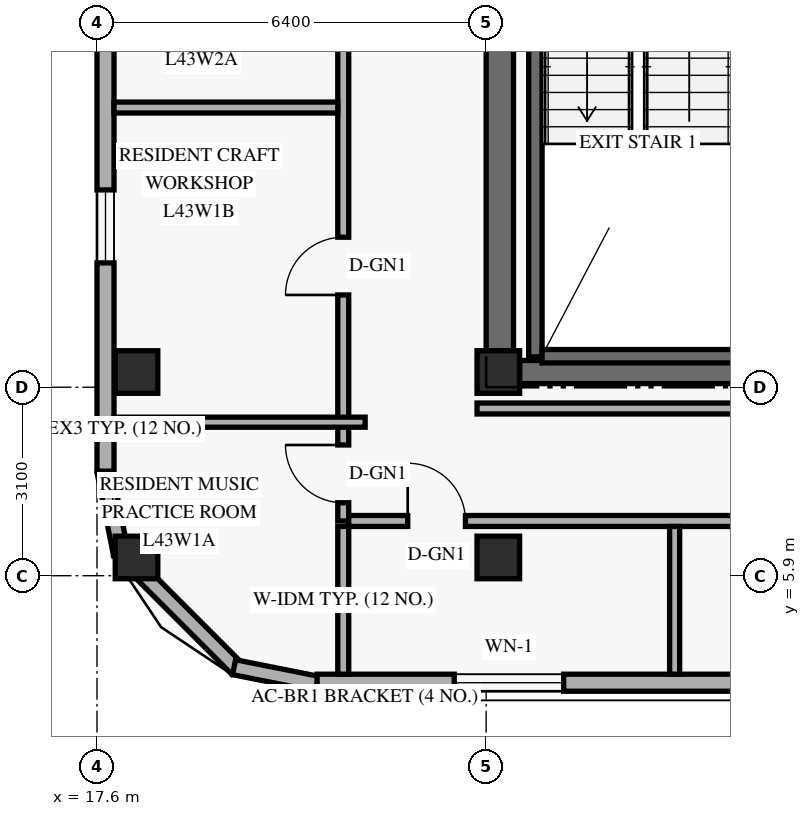
"""IFC4 building model, lengths in metres.
Left out: names, types, materials, properties, quantities, classifications, styles, units other than length and angle.
Written with IfcOpenShell. Run it as: python <this file> out.ifc"""

import sys

from ifc_helpers import new_model, si_unit, direction, frame, frame_2d, origin, origin_2d, place, context, subcontext, project, spatial, rectangle, extrude, element, fill, save


model = new_model("IFC4")
c1 = context("Model", 3, precision=1e-05, world=origin(), true_north=direction((0.0, 1.0)))
c2 = subcontext(c1, "Body", "Model", "MODEL_VIEW")
j1 = project(units=[si_unit("LENGTHUNIT", "METRE"), si_unit("PLANEANGLEUNIT", "RADIAN")], contexts=[c1])
p1 = place(None, origin())
s1 = spatial("IfcSite", under=j1, at=p1, CompositionType="ELEMENT")
p2 = place(p1, origin())
s2 = spatial("IfcBuilding", under=s1, at=p2, CompositionType="ELEMENT")
p3 = place(p2, frame((0.0, 0.0, 166.2)))
s3 = spatial("IfcBuildingStorey", under=s2, at=p3, CompositionType="ELEMENT", Elevation=166.2)
p4 = place(p3, frame((24.225, 9.6, 0.0), z_axis=(0.0, 0.0, 1.0), x_axis=(0.0, 1.0, 0.0)))
e1 = element("IfcWall", 1, at=p4, inside=s3, PredefinedType="SHEAR", context=c2, shape_type="SweptSolid", body=[
    extrude(rectangle(XDim=7.6, YDim=0.45, at=frame_2d((3.8, 0.0))), origin(), (0.0, 0.0, 1.0), 2.748),
])
p5 = place(p3, frame((24.55, 9.25, 0.0), z_axis=(0.0, 0.0, 1.0), x_axis=(1.0, 0.0, 0.0)))
e2 = element("IfcWall", 2, at=p5, inside=s3, PredefinedType="SHEAR", context=c2, shape_type="SweptSolid", body=[
    extrude(rectangle(XDim=10.3, YDim=0.38, at=frame_2d((5.15, 0.0))), origin(), (0.0, 0.0, 1.0), 3.36),
])
p6 = place(p5, frame((5.2, 0.0, 0.0)))
e3 = element("IfcOpeningElement", 3, at=p6, cuts=e2, PredefinedType="OPENING", context=c2, shape_type="SweptSolid", body=[
    extrude(rectangle(XDim=1.05, YDim=2.15, at=frame_2d((0.525, 1.075))), frame((0.0, 0.2, 0.0), z_axis=(0.0, -1.0, 0.0), x_axis=(1.0, 0.0, 0.0)), (0.0, 0.0, 1.0), 0.4),
])
p7 = place(p3, frame((24.81, 9.5, 0.0), z_axis=(0.0, 0.0, 1.0), x_axis=(0.0, 1.0, 0.0)))
e4 = element("IfcWall", 4, at=p7, inside=s3, PredefinedType="SHEAR", context=c2, shape_type="SweptSolid", body=[
    extrude(rectangle(XDim=7.76, YDim=0.22, at=frame_2d((3.88, 0.0))), origin(), (0.0, 0.0, 1.0), 3.36),
])
p8 = place(p3, frame((24.92, 9.51, 0.0), z_axis=(0.0, 0.0, 1.0), x_axis=(1.0, 0.0, 0.0)))
e5 = element("IfcWall", 5, at=p8, inside=s3, PredefinedType="SHEAR", context=c2, shape_type="SweptSolid", body=[
    extrude(rectangle(XDim=3.16, YDim=0.22, at=frame_2d((1.58, 0.0))), origin(), (0.0, 0.0, 1.0), 3.36),
])
for number, where, z_axis, x_axis in (
    (6, (18.25, 6.2, 0.0), (0.0, 0.0, 1.0), (1.0, 0.0, 0.0)),
    (7, (18.25, 9.25, 0.0), (0.0, 0.0, 1.0), (1.0, 0.0, 0.0)),
    (8, (24.2, 6.2, 0.0), (0.0, 0.0, 1.0), (1.0, 0.0, 0.0)),
    (9, (24.2, 9.25, 0.0), (0.0, 0.0, 1.0), (1.0, 0.0, 0.0)),
):
    element("IfcColumn", number, at=place(p3, frame(where, z_axis=z_axis, x_axis=x_axis)), inside=s3, PredefinedType="COLUMN", context=c2, shape_type="SweptSolid", body=[
        extrude(rectangle(XDim=0.7, YDim=0.7, at=origin_2d()), origin(), (0.0, 0.0, 1.0), 3.6),
    ])
p9 = place(p3, frame((17.724, 7.616, 0.0), z_axis=(0.0, 0.0, 1.0), x_axis=(0.195135625965, -0.9807762678, 0.0)))
e10 = element("IfcWall", 10, at=p9, inside=s3, PredefinedType="SOLIDWALL", context=c2, shape_type="SweptSolid", body=[
    extrude(rectangle(XDim=1.389, YDim=0.25, at=frame_2d((0.694, 0.0))), origin(), (0.0, 0.0, 1.0), 3.36),
])
p10 = place(p3, frame((17.968, 6.305, 0.0), z_axis=(0.0, 0.0, 1.0), x_axis=(0.707106781187, -0.707106781187, 0.0)))
e11 = element("IfcWall", 11, at=p10, inside=s3, PredefinedType="SOLIDWALL", context=c2, shape_type="SweptSolid", body=[
    extrude(rectangle(XDim=2.739, YDim=0.25, at=frame_2d((1.37, 0.0))), origin(), (0.0, 0.0, 1.0), 3.36),
])
p11 = place(p3, frame((19.854, 4.395, 0.0), z_axis=(0.0, 0.0, 1.0), x_axis=(0.980809899341, -0.19496651342, 0.0)))
e12 = element("IfcWall", 12, at=p11, inside=s3, PredefinedType="SOLIDWALL", context=c2, shape_type="SweptSolid", body=[
    extrude(rectangle(XDim=1.389, YDim=0.25, at=frame_2d((0.694, 0.0))), origin(), (0.0, 0.0, 1.0), 3.36),
])
p12 = place(p3, frame((21.22, 4.14, 0.0), z_axis=(0.0, 0.0, 1.0), x_axis=(1.0, 0.0, 0.0)))
e13 = element("IfcWall", 13, at=p12, inside=s3, PredefinedType="SOLIDWALL", context=c2, shape_type="SweptSolid", body=[
    extrude(rectangle(XDim=33.76, YDim=0.28, at=frame_2d((16.88, 0.0))), origin(), (0.0, 0.0, 1.0), 3.36),
])
p13 = place(p12, frame((2.255, 0.0, 0.85)))
e14 = element("IfcOpeningElement", 14, at=p13, cuts=e13, PredefinedType="OPENING", context=c2, shape_type="SweptSolid", body=[
    extrude(rectangle(XDim=1.8, YDim=1.6, at=frame_2d((0.9, 0.8))), frame((0.0, 0.15, 0.0), z_axis=(0.0, -1.0, 0.0), x_axis=(1.0, 0.0, 0.0)), (0.0, 0.0, 1.0), 0.3),
])
p14 = place(p12, frame((9.14, 0.0, 0.85)))
e15 = element("IfcOpeningElement", 15, at=p14, cuts=e13, PredefinedType="OPENING", context=c2, shape_type="SweptSolid", body=[
    extrude(rectangle(XDim=1.8, YDim=1.6, at=frame_2d((0.9, 0.8))), frame((0.0, 0.15, 0.0), z_axis=(0.0, -1.0, 0.0), x_axis=(1.0, 0.0, 0.0)), (0.0, 0.0, 1.0), 0.3),
])
p15 = place(p12, frame((14.565, 0.0, 0.85)))
e16 = element("IfcOpeningElement", 16, at=p15, cuts=e13, PredefinedType="OPENING", context=c2, shape_type="SweptSolid", body=[
    extrude(rectangle(XDim=1.8, YDim=1.6, at=frame_2d((0.9, 0.8))), frame((0.0, 0.15, 0.0), z_axis=(0.0, -1.0, 0.0), x_axis=(1.0, 0.0, 0.0)), (0.0, 0.0, 1.0), 0.3),
])
p16 = place(p12, frame((20.088, 0.0, 0.85)))
e17 = element("IfcOpeningElement", 17, at=p16, cuts=e13, PredefinedType="OPENING", context=c2, shape_type="SweptSolid", body=[
    extrude(rectangle(XDim=1.8, YDim=1.6, at=frame_2d((0.9, 0.8))), frame((0.0, 0.15, 0.0), z_axis=(0.0, -1.0, 0.0), x_axis=(1.0, 0.0, 0.0)), (0.0, 0.0, 1.0), 0.3),
])
p17 = place(p12, frame((25.546, 0.0, 0.85)))
e18 = element("IfcOpeningElement", 18, at=p17, cuts=e13, PredefinedType="OPENING", context=c2, shape_type="SweptSolid", body=[
    extrude(rectangle(XDim=1.2, YDim=1.5, at=frame_2d((0.6, 0.75))), frame((0.0, 0.15, 0.0), z_axis=(0.0, -1.0, 0.0), x_axis=(1.0, 0.0, 0.0)), (0.0, 0.0, 1.0), 0.3),
])
p18 = place(p12, frame((29.503, 0.0, 0.85)))
e19 = element("IfcOpeningElement", 19, at=p18, cuts=e13, PredefinedType="OPENING", context=c2, shape_type="SweptSolid", body=[
    extrude(rectangle(XDim=1.8, YDim=1.6, at=frame_2d((0.9, 0.8))), frame((0.0, 0.15, 0.0), z_axis=(0.0, -1.0, 0.0), x_axis=(1.0, 0.0, 0.0)), (0.0, 0.0, 1.0), 0.3),
])
p19 = place(p3, frame((17.74, 40.38, 0.0), z_axis=(0.0, 0.0, 1.0), x_axis=(0.0, -1.0, 0.0)))
e20 = element("IfcWall", 20, at=p19, inside=s3, PredefinedType="SOLIDWALL", context=c2, shape_type="SweptSolid", body=[
    extrude(rectangle(XDim=32.76, YDim=0.28, at=frame_2d((16.38, 0.0))), origin(), (0.0, 0.0, 1.0), 3.36),
])
p20 = place(p19, frame((28.135, 0.0, 0.85)))
e21 = element("IfcOpeningElement", 21, at=p20, cuts=e20, PredefinedType="OPENING", context=c2, shape_type="SweptSolid", body=[
    extrude(rectangle(XDim=1.2, YDim=1.5, at=frame_2d((0.6, 0.75))), frame((0.0, 0.15, 0.0), z_axis=(0.0, -1.0, 0.0), x_axis=(1.0, 0.0, 0.0)), (0.0, 0.0, 1.0), 0.3),
])
p21 = place(p19, frame((24.425, 0.0, 0.85)))
e22 = element("IfcOpeningElement", 22, at=p21, cuts=e20, PredefinedType="OPENING", context=c2, shape_type="SweptSolid", body=[
    extrude(rectangle(XDim=1.2, YDim=1.5, at=frame_2d((0.6, 0.75))), frame((0.0, 0.15, 0.0), z_axis=(0.0, -1.0, 0.0), x_axis=(1.0, 0.0, 0.0)), (0.0, 0.0, 1.0), 0.3),
])
p22 = place(p19, frame((18.38, 0.0, 0.85)))
e23 = element("IfcOpeningElement", 23, at=p22, cuts=e20, PredefinedType="OPENING", context=c2, shape_type="SweptSolid", body=[
    extrude(rectangle(XDim=1.2, YDim=1.5, at=frame_2d((0.6, 0.75))), frame((0.0, 0.15, 0.0), z_axis=(0.0, -1.0, 0.0), x_axis=(1.0, 0.0, 0.0)), (0.0, 0.0, 1.0), 0.3),
])
p23 = place(p19, frame((12.955, 0.0, 0.85)))
e24 = element("IfcOpeningElement", 24, at=p23, cuts=e20, PredefinedType="OPENING", context=c2, shape_type="SweptSolid", body=[
    extrude(rectangle(XDim=1.2, YDim=1.5, at=frame_2d((0.6, 0.75))), frame((0.0, 0.15, 0.0), z_axis=(0.0, -1.0, 0.0), x_axis=(1.0, 0.0, 0.0)), (0.0, 0.0, 1.0), 0.3),
])
p24 = place(p19, frame((7.26, 0.0, 0.85)))
e25 = element("IfcOpeningElement", 25, at=p24, cuts=e20, PredefinedType="OPENING", context=c2, shape_type="SweptSolid", body=[
    extrude(rectangle(XDim=1.2, YDim=1.5, at=frame_2d((0.6, 0.75))), frame((0.0, 0.15, 0.0), z_axis=(0.0, -1.0, 0.0), x_axis=(1.0, 0.0, 0.0)), (0.0, 0.0, 1.0), 0.3),
])
p25 = place(p19, frame((3.425, 0.0, 0.85)))
e26 = element("IfcOpeningElement", 26, at=p25, cuts=e20, PredefinedType="OPENING", context=c2, shape_type="SweptSolid", body=[
    extrude(rectangle(XDim=1.2, YDim=1.5, at=frame_2d((0.6, 0.75))), frame((0.0, 0.15, 0.0), z_axis=(0.0, -1.0, 0.0), x_axis=(1.0, 0.0, 0.0)), (0.0, 0.0, 1.0), 0.3),
])
p26 = place(p3, frame((21.65, 6.8, 0.0), z_axis=(0.0, 0.0, 1.0), x_axis=(0.0, 1.0, 0.0)))
e27 = element("IfcWall", 27, at=p26, inside=s3, PredefinedType="STANDARD", context=c2, shape_type="SweptSolid", body=[
    extrude(rectangle(XDim=34.4, YDim=0.18, at=frame_2d((17.2, 0.0))), origin(), (0.0, 0.0, 1.0), 2.73),
])
p27 = place(p26, frame((0.3, 0.0, 0.0)))
e28 = element("IfcOpeningElement", 28, at=p27, cuts=e27, PredefinedType="OPENING", context=c2, shape_type="SweptSolid", body=[
    extrude(rectangle(XDim=0.95, YDim=2.15, at=frame_2d((0.475, 1.075))), frame((0.0, 0.1, 0.0), z_axis=(0.0, -1.0, 0.0), x_axis=(1.0, 0.0, 0.0)), (0.0, 0.0, 1.0), 0.2),
])
p28 = place(p26, frame((3.718, 0.0, 0.0)))
e29 = element("IfcOpeningElement", 29, at=p28, cuts=e27, PredefinedType="OPENING", context=c2, shape_type="SweptSolid", body=[
    extrude(rectangle(XDim=0.95, YDim=2.15, at=frame_2d((0.475, 1.075))), frame((0.0, 0.1, 0.0), z_axis=(0.0, -1.0, 0.0), x_axis=(1.0, 0.0, 0.0)), (0.0, 0.0, 1.0), 0.2),
])
p29 = place(p26, frame((8.995, 0.0, 0.0)))
e30 = element("IfcOpeningElement", 30, at=p29, cuts=e27, PredefinedType="OPENING", context=c2, shape_type="SweptSolid", body=[
    extrude(rectangle(XDim=0.95, YDim=2.15, at=frame_2d((0.475, 1.075))), frame((0.0, 0.1, 0.0), z_axis=(0.0, -1.0, 0.0), x_axis=(1.0, 0.0, 0.0)), (0.0, 0.0, 1.0), 0.2),
])
p30 = place(p26, frame((14.105, 0.0, 0.0)))
e31 = element("IfcOpeningElement", 31, at=p30, cuts=e27, PredefinedType="OPENING", context=c2, shape_type="SweptSolid", body=[
    extrude(rectangle(XDim=0.95, YDim=2.15, at=frame_2d((0.475, 1.075))), frame((0.0, 0.1, 0.0), z_axis=(0.0, -1.0, 0.0), x_axis=(1.0, 0.0, 0.0)), (0.0, 0.0, 1.0), 0.2),
])
p31 = place(p26, frame((19.62, 0.0, 0.0)))
e32 = element("IfcOpeningElement", 32, at=p31, cuts=e27, PredefinedType="OPENING", context=c2, shape_type="SweptSolid", body=[
    extrude(rectangle(XDim=0.95, YDim=2.15, at=frame_2d((0.475, 1.075))), frame((0.0, 0.1, 0.0), z_axis=(0.0, -1.0, 0.0), x_axis=(1.0, 0.0, 0.0)), (0.0, 0.0, 1.0), 0.2),
])
p32 = place(p26, frame((24.73, 0.0, 0.0)))
e33 = element("IfcOpeningElement", 33, at=p32, cuts=e27, PredefinedType="OPENING", context=c2, shape_type="SweptSolid", body=[
    extrude(rectangle(XDim=0.95, YDim=2.15, at=frame_2d((0.475, 1.075))), frame((0.0, 0.1, 0.0), z_axis=(0.0, -1.0, 0.0), x_axis=(1.0, 0.0, 0.0)), (0.0, 0.0, 1.0), 0.2),
])
p33 = place(p26, frame((29.333, 0.0, 0.0)))
e34 = element("IfcOpeningElement", 34, at=p33, cuts=e27, PredefinedType="OPENING", context=c2, shape_type="SweptSolid", body=[
    extrude(rectangle(XDim=0.95, YDim=2.15, at=frame_2d((0.475, 1.075))), frame((0.0, 0.1, 0.0), z_axis=(0.0, -1.0, 0.0), x_axis=(1.0, 0.0, 0.0)), (0.0, 0.0, 1.0), 0.2),
])
p34 = place(p26, frame((33.19, 0.0, 0.0)))
e35 = element("IfcOpeningElement", 35, at=p34, cuts=e27, PredefinedType="OPENING", context=c2, shape_type="SweptSolid", body=[
    extrude(rectangle(XDim=0.95, YDim=2.15, at=frame_2d((0.475, 1.075))), frame((0.0, 0.1, 0.0), z_axis=(0.0, -1.0, 0.0), x_axis=(1.0, 0.0, 0.0)), (0.0, 0.0, 1.0), 0.2),
])
p35 = place(p3, frame((21.74, 6.8, 0.0), z_axis=(0.0, 0.0, 1.0), x_axis=(1.0, 0.0, 0.0)))
e36 = element("IfcWall", 36, at=p35, inside=s3, PredefinedType="STANDARD", context=c2, shape_type="SweptSolid", body=[
    extrude(rectangle(XDim=13.68, YDim=0.18, at=frame_2d((6.84, 0.0))), origin(), (0.0, 0.0, 1.0), 2.73),
])
p36 = place(p35, frame((0.97, 0.0, 0.0)))
e37 = element("IfcOpeningElement", 37, at=p36, cuts=e36, PredefinedType="OPENING", context=c2, shape_type="SweptSolid", body=[
    extrude(rectangle(XDim=0.95, YDim=2.15, at=frame_2d((0.475, 1.075))), frame((0.0, 0.1, 0.0), z_axis=(0.0, -1.0, 0.0), x_axis=(1.0, 0.0, 0.0)), (0.0, 0.0, 1.0), 0.2),
])
p37 = place(p35, frame((9.11, 0.0, 0.0)))
e38 = element("IfcOpeningElement", 38, at=p37, cuts=e36, PredefinedType="OPENING", context=c2, shape_type="SweptSolid", body=[
    extrude(rectangle(XDim=0.95, YDim=2.15, at=frame_2d((0.475, 1.075))), frame((0.0, 0.1, 0.0), z_axis=(0.0, -1.0, 0.0), x_axis=(1.0, 0.0, 0.0)), (0.0, 0.0, 1.0), 0.2),
])
p38 = place(p3, frame((23.85, 8.65, 0.0), z_axis=(0.0, 0.0, 1.0), x_axis=(1.0, 0.0, 0.0)))
e39 = element("IfcWall", 39, at=p38, inside=s3, PredefinedType="STANDARD", context=c2, shape_type="SweptSolid", body=[
    extrude(rectangle(XDim=11.57, YDim=0.18, at=frame_2d((5.785, 0.0))), origin(), (0.0, 0.0, 1.0), 2.73),
])
p39 = place(p3, frame((21.65, 4.28, 0.0), z_axis=(0.0, 0.0, 1.0), x_axis=(0.0, 1.0, 0.0)))
e40 = element("IfcWall", 40, at=p39, inside=s3, PredefinedType="PARTITIONING", context=c2, shape_type="SweptSolid", body=[
    extrude(rectangle(XDim=2.43, YDim=0.18, at=frame_2d((1.215, 0.0))), origin(), (0.0, 0.0, 1.0), 2.879),
])
p40 = place(p3, frame((17.88, 8.425, 0.0), z_axis=(0.0, 0.0, 1.0), x_axis=(1.0, 0.0, 0.0)))
e41 = element("IfcWall", 41, at=p40, inside=s3, PredefinedType="PARTITIONING", context=c2, shape_type="SweptSolid", body=[
    extrude(rectangle(XDim=4.13, YDim=0.165, at=frame_2d((2.065, 0.0))), origin(), (0.0, 0.0, 1.0), 2.879),
])
p41 = place(p3, frame((17.88, 13.6, 0.0), z_axis=(0.0, 0.0, 1.0), x_axis=(1.0, 0.0, 0.0)))
e42 = element("IfcWall", 42, at=p41, inside=s3, PredefinedType="PARTITIONING", context=c2, shape_type="SweptSolid", body=[
    extrude(rectangle(XDim=3.68, YDim=0.18, at=frame_2d((1.84, 0.0))), origin(), (0.0, 0.0, 1.0), 2.879),
])
p42 = place(p3, frame((27.1, 4.28, 0.0), z_axis=(0.0, 0.0, 1.0), x_axis=(0.0, 1.0, 0.0)))
e43 = element("IfcWall", 43, at=p42, inside=s3, PredefinedType="PARTITIONING", context=c2, shape_type="SweptSolid", body=[
    extrude(rectangle(XDim=2.43, YDim=0.165, at=frame_2d((1.215, 0.0))), origin(), (0.0, 0.0, 1.0), 2.879),
])
p43 = place(p13, origin())
e44 = element("IfcWindow", 44, at=p43, inside=s3, PartitioningType="SINGLE_PANEL", PredefinedType="WINDOW", context=c2, shape_type="SweptSolid", body=[
    extrude(rectangle(XDim=1.8, YDim=1.6, at=frame_2d((0.9, 0.8))), frame((0.0, 0.03, 0.0), z_axis=(0.0, -1.0, 0.0), x_axis=(1.0, 0.0, 0.0)), (0.0, 0.0, 1.0), 0.06),
])
fill(e14, e44)
p44 = place(p20, origin())
e45 = element("IfcWindow", 45, at=p44, inside=s3, PartitioningType="SINGLE_PANEL", PredefinedType="WINDOW", context=c2, shape_type="SweptSolid", body=[
    extrude(rectangle(XDim=1.2, YDim=1.5, at=frame_2d((0.6, 0.75))), frame((0.0, 0.03, 0.0), z_axis=(0.0, -1.0, 0.0), x_axis=(1.0, 0.0, 0.0)), (0.0, 0.0, 1.0), 0.06),
])
fill(e21, e45)
p45 = place(p27, origin())
e46 = element("IfcDoor", 46, at=p45, inside=s3, OperationType="SINGLE_SWING_RIGHT", PredefinedType="DOOR", context=c2, shape_type="SweptSolid", body=[
    extrude(rectangle(XDim=0.95, YDim=2.15, at=frame_2d((0.475, 1.075))), frame((0.0, 0.025, 0.0), z_axis=(0.0, -1.0, 0.0), x_axis=(1.0, 0.0, 0.0)), (0.0, 0.0, 1.0), 0.05),
])
fill(e28, e46)
p46 = place(p28, origin())
e47 = element("IfcDoor", 47, at=p46, inside=s3, OperationType="SINGLE_SWING_LEFT", PredefinedType="DOOR", context=c2, shape_type="SweptSolid", body=[
    extrude(rectangle(XDim=0.95, YDim=2.15, at=frame_2d((0.475, 1.075))), frame((0.0, 0.025, 0.0), z_axis=(0.0, -1.0, 0.0), x_axis=(1.0, 0.0, 0.0)), (0.0, 0.0, 1.0), 0.05),
])
fill(e29, e47)
p47 = place(p36, origin())
e48 = element("IfcDoor", 48, at=p47, inside=s3, OperationType="SINGLE_SWING_LEFT", PredefinedType="DOOR", context=c2, shape_type="SweptSolid", body=[
    extrude(rectangle(XDim=0.95, YDim=2.15, at=frame_2d((0.475, 1.075))), frame((0.0, 0.025, 0.0), z_axis=(0.0, -1.0, 0.0), x_axis=(1.0, 0.0, 0.0)), (0.0, 0.0, 1.0), 0.05),
])
fill(e37, e48)
save(model, sys.argv[1])
